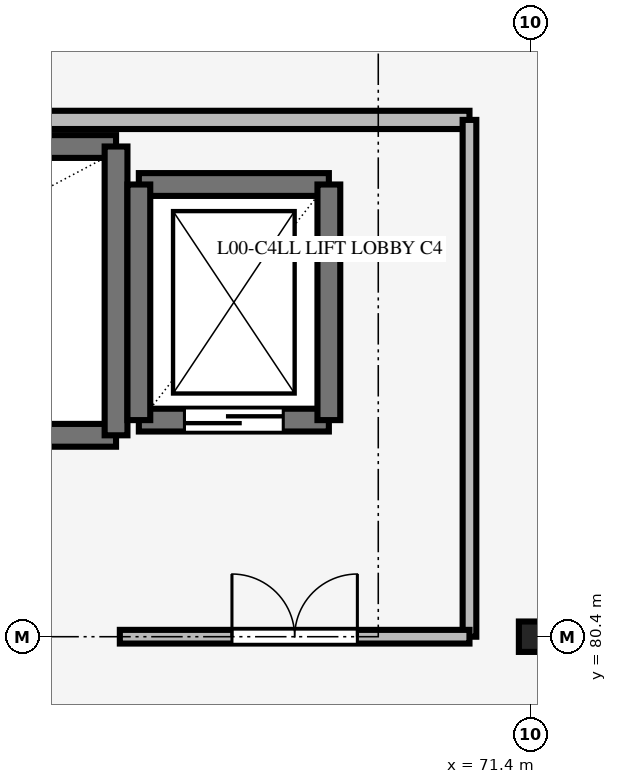
"""IFC4 building model, lengths in metres.
Left out: names, types, materials, properties, quantities, classifications, styles, units other than length and angle.
Written with IfcOpenShell. Run it as: python <this file> out.ifc"""

import sys

from ifc_helpers import new_model, si_unit, direction, frame, frame_2d, origin, origin_2d, place, context, subcontext, project, spatial, rectangle, i_section, extrude, element, fill, save


model = new_model("IFC4")
c1 = context("Model", 3, precision=1e-05, world=origin(), true_north=direction((0.0, 1.0)))
c2 = subcontext(c1, "Body", "Model", "MODEL_VIEW")
j1 = project(units=[si_unit("LENGTHUNIT", "METRE"), si_unit("PLANEANGLEUNIT", "RADIAN")], contexts=[c1])
p1 = place(None, origin())
s1 = spatial("IfcSite", under=j1, at=p1, CompositionType="ELEMENT")
p2 = place(p1, origin())
s2 = spatial("IfcBuilding", under=s1, at=p2, CompositionType="ELEMENT")
p3 = place(p2, origin())
s3 = spatial("IfcBuildingStorey", under=s2, at=p3, CompositionType="ELEMENT", Elevation=0.0)
p4 = place(p3, frame((71.4, 80.4, 0.0), z_axis=(0.0, 0.0, 1.0), x_axis=(1.0, 0.0, 0.0)))
e1 = element("IfcColumn", 1, at=p4, inside=s3, PredefinedType="COLUMN", context=c2, shape_type="SweptSolid", body=[
    extrude(i_section(OverallWidth=0.3, OverallDepth=0.4, WebThickness=0.013, FlangeThickness=0.024, FilletRadius=0.027, at=origin_2d()), origin(), (0.0, 0.0, 1.0), 6.0),
])
for number, where, z_axis, x_axis in (
    (2, (65.95, 83.05, 0.0), (0.0, 0.0, 1.0), (-1.0, 0.0, 0.0)),
    (3, (56.45, 86.85, 0.0), (0.0, 0.0, 1.0), (1.0, 0.0, 0.0)),
):
    element("IfcWall", number, at=place(p3, frame(where, z_axis=z_axis, x_axis=x_axis)), inside=s3, PredefinedType="SHEAR", context=c2, shape_type="SweptSolid", body=[
        extrude(rectangle(XDim=9.5, YDim=0.3, at=frame_2d((4.75, 0.0))), origin(), (0.0, 0.0, 1.0), 6.0),
    ])
p5 = place(p3, frame((65.95, 83.05, 0.0), z_axis=(0.0, 0.0, 1.0), x_axis=(0.0, 1.0, 0.0)))
e4 = element("IfcWall", 4, at=p5, inside=s3, PredefinedType="SHEAR", context=c2, shape_type="SweptSolid", body=[
    extrude(rectangle(XDim=3.8, YDim=0.3, at=frame_2d((1.9, 0.0))), origin(), (0.0, 0.0, 1.0), 6.0),
])
p6 = place(p3, frame((66.25, 83.25, 0.0), z_axis=(0.0, 0.0, 1.0), x_axis=(1.0, 0.0, 0.0)))
e5 = element("IfcWall", 5, at=p6, inside=s3, PredefinedType="SHEAR", context=c2, shape_type="SweptSolid", body=[
    extrude(rectangle(XDim=2.5, YDim=0.3, at=frame_2d((1.25, 0.0))), origin(), (0.0, 0.0, 1.0), 5.66),
])
p7 = place(p6, frame((0.6, 0.0, 0.0)))
e6 = element("IfcOpeningElement", 6, at=p7, cuts=e5, PredefinedType="OPENING", context=c2, shape_type="SweptSolid", body=[
    extrude(rectangle(XDim=1.3, YDim=2.2, at=frame_2d((0.65, 1.1))), frame((0.0, 0.16, 0.0), z_axis=(0.0, -1.0, 0.0), x_axis=(1.0, 0.0, 0.0)), (0.0, 0.0, 1.0), 0.32),
])
p8 = place(p3, frame((66.25, 86.35, 0.0), z_axis=(0.0, 0.0, 1.0), x_axis=(1.0, 0.0, 0.0)))
e7 = element("IfcWall", 7, at=p8, inside=s3, PredefinedType="SHEAR", context=c2, shape_type="SweptSolid", body=[
    extrude(rectangle(XDim=2.5, YDim=0.3, at=frame_2d((1.25, 0.0))), origin(), (0.0, 0.0, 1.0), 5.66),
])
for number, where, z_axis, x_axis in (
    (8, (66.25, 83.25, 0.0), (0.0, 0.0, 1.0), (0.0, 1.0, 0.0)),
    (9, (68.75, 83.25, 0.0), (0.0, 0.0, 1.0), (0.0, 1.0, 0.0)),
):
    element("IfcWall", number, at=place(p3, frame(where, z_axis=z_axis, x_axis=x_axis)), inside=s3, PredefinedType="SHEAR", context=c2, shape_type="SweptSolid", body=[
        extrude(rectangle(XDim=3.1, YDim=0.3, at=frame_2d((1.55, 0.0))), origin(), (0.0, 0.0, 1.0), 5.66),
    ])
p9 = place(p3, frame((54.8, 87.2, 0.0), z_axis=(0.0, 0.0, 1.0), x_axis=(1.0, 0.0, 0.0)))
e10 = element("IfcWall", 10, at=p9, inside=s3, PredefinedType="STANDARD", context=c2, shape_type="SweptSolid", body=[
    extrude(rectangle(XDim=15.8, YDim=0.24, at=frame_2d((7.9, 0.0))), origin(), (0.0, 0.0, 1.0), 3.05),
])
p10 = place(p3, frame((70.6, 80.4, 0.0), z_axis=(0.0, 0.0, 1.0), x_axis=(0.0, 1.0, 0.0)))
e11 = element("IfcWall", 11, at=p10, inside=s3, PredefinedType="STANDARD", context=c2, shape_type="SweptSolid", body=[
    extrude(rectangle(XDim=6.8, YDim=0.18, at=frame_2d((3.4, 0.0))), origin(), (0.0, 0.0, 1.0), 3.05),
])
p11 = place(p3, frame((66.0, 80.4, 0.0), z_axis=(0.0, 0.0, 1.0), x_axis=(1.0, 0.0, 0.0)))
e12 = element("IfcWall", 12, at=p11, inside=s3, PredefinedType="STANDARD", context=c2, shape_type="SweptSolid", body=[
    extrude(rectangle(XDim=4.6, YDim=0.18, at=frame_2d((2.3, 0.0))), origin(), (0.0, 0.0, 1.0), 3.05),
])
p12 = place(p11, frame((1.475, 0.0, 0.0)))
e13 = element("IfcOpeningElement", 13, at=p12, cuts=e12, PredefinedType="OPENING", context=c2, shape_type="SweptSolid", body=[
    extrude(rectangle(XDim=1.65, YDim=2.2, at=frame_2d((0.825, 1.1))), frame((0.0, 0.1, 0.0), z_axis=(0.0, -1.0, 0.0), x_axis=(1.0, 0.0, 0.0)), (0.0, 0.0, 1.0), 0.2),
])
p13 = place(p7, origin())
e14 = element("IfcDoor", 14, at=p13, inside=s3, OperationType="DOUBLE_DOOR_SLIDING", PredefinedType="DOOR", context=c2, shape_type="SweptSolid", body=[
    extrude(rectangle(XDim=1.3, YDim=2.2, at=frame_2d((0.65, 1.1))), frame((0.0, 0.025, 0.0), z_axis=(0.0, -1.0, 0.0), x_axis=(1.0, 0.0, 0.0)), (0.0, 0.0, 1.0), 0.05),
])
fill(e6, e14)
p14 = place(p12, origin())
e15 = element("IfcDoor", 15, at=p14, inside=s3, OperationType="DOUBLE_DOOR_SINGLE_SWING", PredefinedType="DOOR", context=c2, shape_type="SweptSolid", body=[
    extrude(rectangle(XDim=1.65, YDim=2.2, at=frame_2d((0.825, 1.1))), frame((0.0, 0.025, 0.0), z_axis=(0.0, -1.0, 0.0), x_axis=(1.0, 0.0, 0.0)), (0.0, 0.0, 1.0), 0.05),
])
fill(e13, e15)
save(model, sys.argv[1])
